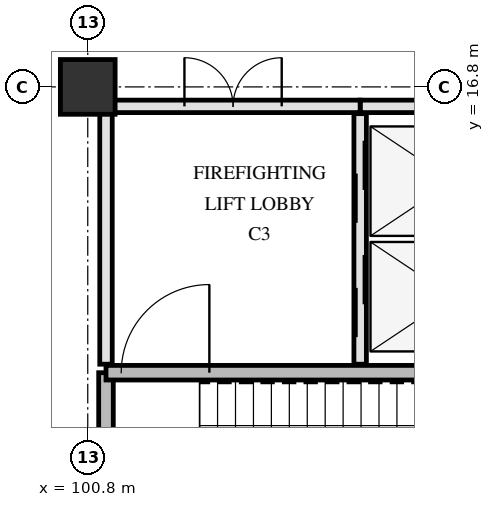
"""IFC4 building model, lengths in metres.
Left out: names, types, materials, properties, quantities, classifications, styles, units other than length and angle.
Written with IfcOpenShell. Run it as: python <this file> out.ifc"""

import sys

from ifc_helpers import new_model, si_unit, direction, frame, frame_2d, origin, origin_2d, place, context, subcontext, project, spatial, rectangle, extrude, element, fill, save


model = new_model("IFC4")
c1 = context("Model", 3, precision=1e-05, world=origin(), true_north=direction((0.0, 1.0)))
c2 = subcontext(c1, "Body", "Model", "MODEL_VIEW")
j1 = project(units=[si_unit("LENGTHUNIT", "METRE"), si_unit("PLANEANGLEUNIT", "RADIAN")], contexts=[c1])
p1 = place(None, origin())
s1 = spatial("IfcSite", under=j1, at=p1, CompositionType="ELEMENT")
p2 = place(p1, origin())
s2 = spatial("IfcBuilding", under=s1, at=p2, CompositionType="ELEMENT")
p3 = place(p2, frame((0.0, 0.0, -5.4)))
s3 = spatial("IfcBuildingStorey", under=s2, at=p3, CompositionType="ELEMENT", Elevation=-5.4)
p4 = place(p3, frame((100.8, 16.8, 0.0), z_axis=(0.0, 0.0, 1.0), x_axis=(1.0, 0.0, 0.0)))
e1 = element("IfcColumn", 1, at=p4, inside=s3, PredefinedType="COLUMN", context=c2, shape_type="SweptSolid", body=[
    extrude(rectangle(XDim=0.9, YDim=0.9, at=origin_2d()), origin(), (0.0, 0.0, 1.0), 5.4),
])
p5 = place(p3, frame((101.1, 8.78, 0.0), z_axis=(0.0, 0.0, 1.0), x_axis=(0.0, 1.0, 0.0)))
e2 = element("IfcWall", 2, at=p5, inside=s3, PredefinedType="SHEAR", context=c2, shape_type="SweptSolid", body=[
    extrude(rectangle(XDim=3.32, YDim=0.24, at=frame_2d((1.66, 0.0))), origin(), (0.0, 0.0, 1.0), 5.08),
])
p6 = place(p3, frame((101.1, 12.1, 0.0), z_axis=(0.0, 0.0, 1.0), x_axis=(1.0, 0.0, 0.0)))
e3 = element("IfcWall", 3, at=p6, inside=s3, PredefinedType="SHEAR", context=c2, shape_type="SweptSolid", body=[
    extrude(rectangle(XDim=7.82, YDim=0.24, at=frame_2d((3.91, 0.0))), origin(), (0.0, 0.0, 1.0), 5.08),
])
p7 = place(p6, frame((0.25, 0.0, 0.0)))
e4 = element("IfcOpeningElement", 4, at=p7, cuts=e3, PredefinedType="OPENING", context=c2, shape_type="SweptSolid", body=[
    extrude(rectangle(XDim=1.45, YDim=2.2, at=frame_2d((0.725, 1.1))), frame((0.0, 0.13, 0.0), z_axis=(0.0, -1.0, 0.0), x_axis=(1.0, 0.0, 0.0)), (0.0, 0.0, 1.0), 0.26),
])
p8 = place(p3, frame((105.28, 12.24, 0.0), z_axis=(0.0, 0.0, 1.0), x_axis=(0.0, 1.0, 0.0)))
e5 = element("IfcWall", 5, at=p8, inside=s3, PredefinedType="PARTITIONING", context=c2, shape_type="SweptSolid", body=[
    extrude(rectangle(XDim=4.12, YDim=0.205, at=frame_2d((2.06, 0.0))), origin(), (0.0, 0.0, 1.0), 5.07),
])
p9 = place(p8, frame((0.445, 0.0, 0.0)))
e6 = element("IfcOpeningElement", 6, at=p9, cuts=e5, PredefinedType="OPENING", context=c2, shape_type="SweptSolid", body=[
    extrude(rectangle(XDim=1.35, YDim=2.2, at=frame_2d((0.675, 1.1))), frame((0.0, 0.113, 0.0), z_axis=(0.0, -1.0, 0.0), x_axis=(1.0, 0.0, 0.0)), (0.0, 0.0, 1.0), 0.225),
])
p10 = place(p8, frame((2.325, 0.0, 0.0)))
e7 = element("IfcOpeningElement", 7, at=p10, cuts=e5, PredefinedType="OPENING", context=c2, shape_type="SweptSolid", body=[
    extrude(rectangle(XDim=1.35, YDim=2.2, at=frame_2d((0.675, 1.1))), frame((0.0, 0.113, 0.0), z_axis=(0.0, -1.0, 0.0), x_axis=(1.0, 0.0, 0.0)), (0.0, 0.0, 1.0), 0.225),
])
p11 = place(p3, frame((105.28, 16.48, 0.0), z_axis=(0.0, 0.0, 1.0), x_axis=(1.0, 0.0, 0.0)))
e8 = element("IfcWall", 8, at=p11, inside=s3, PredefinedType="PARTITIONING", context=c2, shape_type="SweptSolid", body=[
    extrude(rectangle(XDim=3.57, YDim=0.205, at=frame_2d((1.785, 0.0))), origin(), (0.0, 0.0, 1.0), 4.42),
])
p12 = place(p3, frame((101.1, 12.24, 0.0), z_axis=(0.0, 0.0, 1.0), x_axis=(0.0, 1.0, 0.0)))
e9 = element("IfcWall", 9, at=p12, inside=s3, PredefinedType="PARTITIONING", context=c2, shape_type="SweptSolid", body=[
    extrude(rectangle(XDim=4.12, YDim=0.205, at=frame_2d((2.06, 0.0))), origin(), (0.0, 0.0, 1.0), 4.47),
])
p13 = place(p3, frame((101.1, 16.48, 0.0), z_axis=(0.0, 0.0, 1.0), x_axis=(1.0, 0.0, 0.0)))
e10 = element("IfcWall", 10, at=p13, inside=s3, PredefinedType="PARTITIONING", context=c2, shape_type="SweptSolid", body=[
    extrude(rectangle(XDim=4.18, YDim=0.205, at=frame_2d((2.09, 0.0))), origin(), (0.0, 0.0, 1.0), 4.42),
])
p14 = place(p13, frame((1.29, 0.0, 0.0)))
e11 = element("IfcOpeningElement", 11, at=p14, cuts=e10, PredefinedType="OPENING", context=c2, shape_type="SweptSolid", body=[
    extrude(rectangle(XDim=1.6, YDim=2.25, at=frame_2d((0.8, 1.125))), frame((0.0, 0.113, 0.0), z_axis=(0.0, -1.0, 0.0), x_axis=(1.0, 0.0, 0.0)), (0.0, 0.0, 1.0), 0.225),
])
p15 = place(p7, origin())
e12 = element("IfcDoor", 12, at=p15, inside=s3, OperationType="SINGLE_SWING_RIGHT", PredefinedType="DOOR", context=c2, shape_type="SweptSolid", body=[
    extrude(rectangle(XDim=1.45, YDim=2.2, at=frame_2d((0.725, 1.1))), frame((0.0, 0.025, 0.0), z_axis=(0.0, -1.0, 0.0), x_axis=(1.0, 0.0, 0.0)), (0.0, 0.0, 1.0), 0.05),
])
fill(e4, e12)
p16 = place(p9, origin())
e13 = element("IfcDoor", 13, at=p16, inside=s3, OperationType="SLIDING_TO_LEFT", PredefinedType="DOOR", context=c2, shape_type="SweptSolid", body=[
    extrude(rectangle(XDim=1.35, YDim=2.2, at=frame_2d((0.675, 1.1))), frame((0.0, 0.025, 0.0), z_axis=(0.0, -1.0, 0.0), x_axis=(1.0, 0.0, 0.0)), (0.0, 0.0, 1.0), 0.05),
])
fill(e6, e13)
p17 = place(p10, origin())
e14 = element("IfcDoor", 14, at=p17, inside=s3, OperationType="SLIDING_TO_LEFT", PredefinedType="DOOR", context=c2, shape_type="SweptSolid", body=[
    extrude(rectangle(XDim=1.35, YDim=2.2, at=frame_2d((0.675, 1.1))), frame((0.0, 0.025, 0.0), z_axis=(0.0, -1.0, 0.0), x_axis=(1.0, 0.0, 0.0)), (0.0, 0.0, 1.0), 0.05),
])
fill(e7, e14)
p18 = place(p14, origin())
e15 = element("IfcDoor", 15, at=p18, inside=s3, OperationType="DOUBLE_SWING_LEFT", PredefinedType="DOOR", context=c2, shape_type="SweptSolid", body=[
    extrude(rectangle(XDim=1.6, YDim=2.25, at=frame_2d((0.8, 1.125))), frame((0.0, 0.025, 0.0), z_axis=(0.0, -1.0, 0.0), x_axis=(1.0, 0.0, 0.0)), (0.0, 0.0, 1.0), 0.05),
])
fill(e11, e15)
save(model, sys.argv[1])
